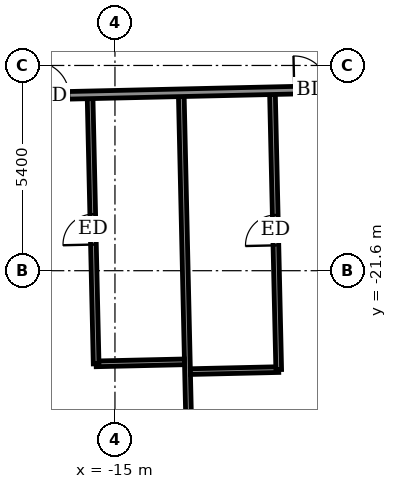
"""IFC4 building model, lengths in metres.
Left out: names, types, materials, properties, quantities, classifications, styles, units other than length and angle.
Written with IfcOpenShell. Run it as: python <this file> out.ifc"""

import sys

from ifc_helpers import new_model, si_unit, direction, frame, frame_2d, origin, place, context, subcontext, project, spatial, rectangle, extrude, element, fill, save


model = new_model("IFC4")
c1 = context("Model", 3, precision=1e-05, world=origin(), true_north=direction((0.0, 1.0)))
c2 = subcontext(c1, "Body", "Model", "MODEL_VIEW")
j1 = project(units=[si_unit("LENGTHUNIT", "METRE"), si_unit("PLANEANGLEUNIT", "RADIAN")], contexts=[c1])
p1 = place(None, origin())
s1 = spatial("IfcSite", under=j1, at=p1, CompositionType="ELEMENT")
p2 = place(p1, origin())
s2 = spatial("IfcBuilding", under=s1, at=p2, CompositionType="ELEMENT")
p3 = place(p2, frame((0.0, 0.0, 34.1)))
s3 = spatial("IfcBuildingStorey", under=s2, at=p3, CompositionType="ELEMENT", Elevation=34.1)
p4 = place(p3, frame((-12.973, -29.415, 0.0), z_axis=(0.0, 0.0, 1.0), x_axis=(-0.022661475803, 0.999743195783, 0.0)))
e1 = element("IfcWall", 1, at=p4, inside=s3, PredefinedType="PARTITIONING", context=c2, shape_type="SweptSolid", body=[
    extrude(rectangle(XDim=12.4, YDim=0.15, at=frame_2d((6.2, 0.0))), origin(), (0.0, 0.0, 1.0), 3.05),
])
p5 = place(p3, frame((-13.015, -24.255, 0.0), z_axis=(0.0, 0.0, 1.0), x_axis=(0.999740260747, 0.02279059109, 0.0)))
e2 = element("IfcWall", 2, at=p5, inside=s3, PredefinedType="PARTITIONING", context=c2, shape_type="SweptSolid", body=[
    extrude(rectangle(XDim=2.324, YDim=0.15, at=frame_2d((1.162, 0.0))), origin(), (0.0, 0.0, 1.0), 3.05),
])
p6 = place(p3, frame((-10.691, -24.202, 0.0), z_axis=(0.0, 0.0, 1.0), x_axis=(-0.022661655024, 0.999743191721, 0.0)))
e3 = element("IfcWall", 3, at=p6, inside=s3, PredefinedType="PARTITIONING", context=c2, shape_type="SweptSolid", body=[
    extrude(rectangle(XDim=7.24, YDim=0.15, at=frame_2d((3.62, 0.0))), origin(), (0.0, 0.0, 1.0), 3.05),
])
p7 = place(p6, frame((3.27, 0.0, 0.0)))
e4 = element("IfcOpeningElement", 4, at=p7, cuts=e3, PredefinedType="OPENING", context=c2, shape_type="SweptSolid", body=[
    extrude(rectangle(XDim=0.8, YDim=2.1, at=frame_2d((0.4, 1.05))), frame((0.0, 0.085, 0.0), z_axis=(0.0, -1.0, 0.0), x_axis=(1.0, 0.0, 0.0)), (0.0, 0.0, 1.0), 0.17),
])
p8 = place(p3, frame((-15.495, -24.051, 0.0), z_axis=(0.0, 0.0, 1.0), x_axis=(0.99974031529, 0.022788198363, 0.0)))
e5 = element("IfcWall", 5, at=p8, inside=s3, PredefinedType="PARTITIONING", context=c2, shape_type="SweptSolid", body=[
    extrude(rectangle(XDim=2.325, YDim=0.15, at=frame_2d((1.162, 0.0))), origin(), (0.0, 0.0, 1.0), 3.05),
])
p9 = place(p3, frame((-15.495, -24.051, 0.0), z_axis=(0.0, 0.0, 1.0), x_axis=(-0.022770667039, 0.999740714747, 0.0)))
e6 = element("IfcWall", 6, at=p9, inside=s3, PredefinedType="PARTITIONING", context=c2, shape_type="SweptSolid", body=[
    extrude(rectangle(XDim=6.98, YDim=0.15, at=frame_2d((3.49, 0.0))), origin(), (0.0, 0.0, 1.0), 3.05),
])
p10 = place(p9, frame((3.14, 0.0, 0.0)))
e7 = element("IfcOpeningElement", 7, at=p10, cuts=e6, PredefinedType="OPENING", context=c2, shape_type="SweptSolid", body=[
    extrude(rectangle(XDim=0.8, YDim=2.1, at=frame_2d((0.4, 1.05))), frame((0.0, 0.085, 0.0), z_axis=(0.0, -1.0, 0.0), x_axis=(1.0, 0.0, 0.0)), (0.0, 0.0, 1.0), 0.17),
])
p11 = place(p3, frame((-30.652, -17.313, 0.0), z_axis=(0.0, 0.0, 1.0), x_axis=(0.999742623764, 0.02268669719, 0.0)))
e8 = element("IfcWall", 8, at=p11, inside=s3, PredefinedType="PARTITIONING", context=c2, shape_type="SweptSolid", body=[
    extrude(rectangle(XDim=58.8, YDim=0.2, at=frame_2d((29.4, 0.0))), origin(), (0.0, 0.0, 1.0), 3.05),
])
p12 = place(p11, frame((3.406, 0.0, 0.0)))
e9 = element("IfcOpeningElement", 9, at=p12, cuts=e8, PredefinedType="OPENING", context=c2, shape_type="SweptSolid", body=[
    extrude(rectangle(XDim=1.0, YDim=2.1, at=frame_2d((0.5, 1.05))), frame((0.0, 0.11, 0.0), z_axis=(0.0, -1.0, 0.0), x_axis=(1.0, 0.0, 0.0)), (0.0, 0.0, 1.0), 0.22),
])
p13 = place(p11, frame((11.475, 0.0, 0.0)))
e10 = element("IfcOpeningElement", 10, at=p13, cuts=e8, PredefinedType="OPENING", context=c2, shape_type="SweptSolid", body=[
    extrude(rectangle(XDim=0.9, YDim=2.1, at=frame_2d((0.45, 1.05))), frame((0.0, 0.11, 0.0), z_axis=(0.0, -1.0, 0.0), x_axis=(1.0, 0.0, 0.0)), (0.0, 0.0, 1.0), 0.22),
])
p14 = place(p11, frame((13.55, 0.0, 0.0)))
e11 = element("IfcOpeningElement", 11, at=p14, cuts=e8, PredefinedType="OPENING", context=c2, shape_type="SweptSolid", body=[
    extrude(rectangle(XDim=0.9, YDim=2.1, at=frame_2d((0.45, 1.05))), frame((0.0, 0.11, 0.0), z_axis=(0.0, -1.0, 0.0), x_axis=(1.0, 0.0, 0.0)), (0.0, 0.0, 1.0), 0.22),
])
p15 = place(p11, frame((20.375, 0.0, 0.0)))
e12 = element("IfcOpeningElement", 12, at=p15, cuts=e8, PredefinedType="OPENING", context=c2, shape_type="SweptSolid", body=[
    extrude(rectangle(XDim=0.9, YDim=2.1, at=frame_2d((0.45, 1.05))), frame((0.0, 0.11, 0.0), z_axis=(0.0, -1.0, 0.0), x_axis=(1.0, 0.0, 0.0)), (0.0, 0.0, 1.0), 0.22),
])
p16 = place(p11, frame((22.625, 0.0, 0.0)))
e13 = element("IfcOpeningElement", 13, at=p16, cuts=e8, PredefinedType="OPENING", context=c2, shape_type="SweptSolid", body=[
    extrude(rectangle(XDim=0.9, YDim=2.1, at=frame_2d((0.45, 1.05))), frame((0.0, 0.11, 0.0), z_axis=(0.0, -1.0, 0.0), x_axis=(1.0, 0.0, 0.0)), (0.0, 0.0, 1.0), 0.22),
])
p17 = place(p11, frame((29.65, 0.0, 0.0)))
e14 = element("IfcOpeningElement", 14, at=p17, cuts=e8, PredefinedType="OPENING", context=c2, shape_type="SweptSolid", body=[
    extrude(rectangle(XDim=0.9, YDim=2.1, at=frame_2d((0.45, 1.05))), frame((0.0, 0.11, 0.0), z_axis=(0.0, -1.0, 0.0), x_axis=(1.0, 0.0, 0.0)), (0.0, 0.0, 1.0), 0.22),
])
p18 = place(p11, frame((31.875, 0.0, 0.0)))
e15 = element("IfcOpeningElement", 15, at=p18, cuts=e8, PredefinedType="OPENING", context=c2, shape_type="SweptSolid", body=[
    extrude(rectangle(XDim=0.9, YDim=2.1, at=frame_2d((0.45, 1.05))), frame((0.0, 0.11, 0.0), z_axis=(0.0, -1.0, 0.0), x_axis=(1.0, 0.0, 0.0)), (0.0, 0.0, 1.0), 0.22),
])
p19 = place(p11, frame((38.9, 0.0, 0.0)))
e16 = element("IfcOpeningElement", 16, at=p19, cuts=e8, PredefinedType="OPENING", context=c2, shape_type="SweptSolid", body=[
    extrude(rectangle(XDim=0.9, YDim=2.1, at=frame_2d((0.45, 1.05))), frame((0.0, 0.11, 0.0), z_axis=(0.0, -1.0, 0.0), x_axis=(1.0, 0.0, 0.0)), (0.0, 0.0, 1.0), 0.22),
])
p20 = place(p11, frame((41.025, 0.0, 0.0)))
e17 = element("IfcOpeningElement", 17, at=p20, cuts=e8, PredefinedType="OPENING", context=c2, shape_type="SweptSolid", body=[
    extrude(rectangle(XDim=0.9, YDim=2.1, at=frame_2d((0.45, 1.05))), frame((0.0, 0.11, 0.0), z_axis=(0.0, -1.0, 0.0), x_axis=(1.0, 0.0, 0.0)), (0.0, 0.0, 1.0), 0.22),
])
p21 = place(p11, frame((47.95, 0.0, 0.0)))
e18 = element("IfcOpeningElement", 18, at=p21, cuts=e8, PredefinedType="OPENING", context=c2, shape_type="SweptSolid", body=[
    extrude(rectangle(XDim=0.9, YDim=2.1, at=frame_2d((0.45, 1.05))), frame((0.0, 0.11, 0.0), z_axis=(0.0, -1.0, 0.0), x_axis=(1.0, 0.0, 0.0)), (0.0, 0.0, 1.0), 0.22),
])
p22 = place(p11, frame((55.6, 0.0, 0.0)))
e19 = element("IfcOpeningElement", 19, at=p22, cuts=e8, PredefinedType="OPENING", context=c2, shape_type="SweptSolid", body=[
    extrude(rectangle(XDim=1.0, YDim=2.1, at=frame_2d((0.5, 1.05))), frame((0.0, 0.11, 0.0), z_axis=(0.0, -1.0, 0.0), x_axis=(1.0, 0.0, 0.0)), (0.0, 0.0, 1.0), 0.22),
])
p23 = place(p11, frame((50.25, 0.0, 0.0)))
e20 = element("IfcOpeningElement", 20, at=p23, cuts=e8, PredefinedType="OPENING", context=c2, shape_type="SweptSolid", body=[
    extrude(rectangle(XDim=0.9, YDim=2.1, at=frame_2d((0.45, 1.05))), frame((0.0, 0.11, 0.0), z_axis=(0.0, -1.0, 0.0), x_axis=(1.0, 0.0, 0.0)), (0.0, 0.0, 1.0), 0.22),
])
p24 = place(p14, origin())
e21 = element("IfcDoor", 21, at=p24, inside=s3, OperationType="SINGLE_SWING_RIGHT", PredefinedType="DOOR", context=c2, shape_type="SweptSolid", body=[
    extrude(rectangle(XDim=0.9, YDim=2.1, at=frame_2d((0.45, 1.05))), frame((0.0, 0.025, 0.0), z_axis=(0.0, -1.0, 0.0), x_axis=(1.0, 0.0, 0.0)), (0.0, 0.0, 1.0), 0.05),
])
fill(e11, e21)
p25 = place(p10, origin())
e22 = element("IfcDoor", 22, at=p25, inside=s3, OperationType="SINGLE_SWING_RIGHT", PredefinedType="DOOR", context=c2, shape_type="SweptSolid", body=[
    extrude(rectangle(XDim=0.8, YDim=2.1, at=frame_2d((0.4, 1.05))), frame((0.0, 0.025, 0.0), z_axis=(0.0, -1.0, 0.0), x_axis=(1.0, 0.0, 0.0)), (0.0, 0.0, 1.0), 0.05),
])
fill(e7, e22)
p26 = place(p15, origin())
e23 = element("IfcDoor", 23, at=p26, inside=s3, OperationType="SINGLE_SWING_LEFT", PredefinedType="DOOR", context=c2, shape_type="SweptSolid", body=[
    extrude(rectangle(XDim=0.9, YDim=2.1, at=frame_2d((0.45, 1.05))), frame((0.0, 0.025, 0.0), z_axis=(0.0, -1.0, 0.0), x_axis=(1.0, 0.0, 0.0)), (0.0, 0.0, 1.0), 0.05),
])
fill(e12, e23)
p27 = place(p7, origin())
e24 = element("IfcDoor", 24, at=p27, inside=s3, OperationType="SINGLE_SWING_LEFT", PredefinedType="DOOR", context=c2, shape_type="SweptSolid", body=[
    extrude(rectangle(XDim=0.8, YDim=2.1, at=frame_2d((0.4, 1.05))), frame((0.0, 0.025, 0.0), z_axis=(0.0, -1.0, 0.0), x_axis=(1.0, 0.0, 0.0)), (0.0, 0.0, 1.0), 0.05),
])
fill(e4, e24)
save(model, sys.argv[1])
